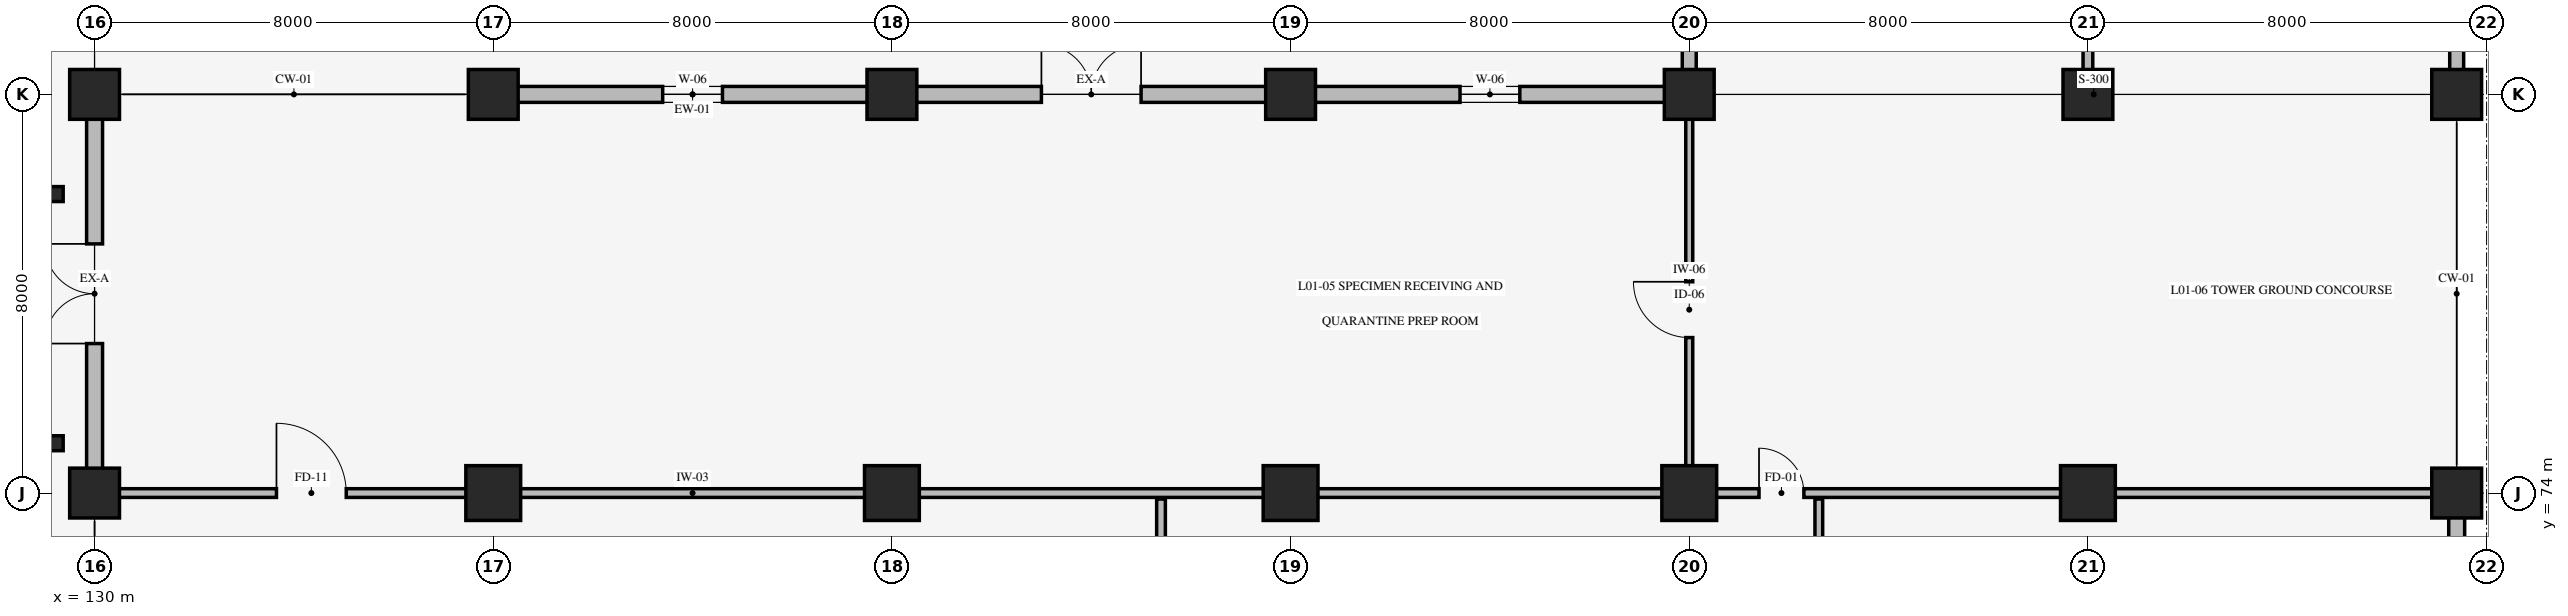
"""IFC4 building model, lengths in metres.
Left out: names, types, materials, properties, quantities, classifications, styles, units other than length and angle.
Written with IfcOpenShell. Run it as: python <this file> out.ifc"""

import sys

from ifc_helpers import new_model, si_unit, direction, frame, frame_2d, origin, origin_2d, place, context, subcontext, project, spatial, rectangle, hollow_rectangle, extrude, element, fill, save


model = new_model("IFC4")
c1 = context("Model", 3, precision=1e-05, world=origin(), true_north=direction((0.0, 1.0)))
c2 = subcontext(c1, "Body", "Model", "MODEL_VIEW")
j1 = project(units=[si_unit("LENGTHUNIT", "METRE"), si_unit("PLANEANGLEUNIT", "RADIAN")], contexts=[c1])
p1 = place(None, origin())
s1 = spatial("IfcSite", under=j1, at=p1, CompositionType="ELEMENT")
p2 = place(p1, origin())
s2 = spatial("IfcBuilding", under=s1, at=p2, CompositionType="ELEMENT")
p3 = place(p2, origin())
s3 = spatial("IfcBuildingStorey", under=s2, at=p3, CompositionType="ELEMENT", Elevation=0.0)
for number, where, z_axis, x_axis in (
    (1, (130.0, 74.0, 0.0), (0.0, 0.0, 1.0), (1.0, 0.0, 0.0)),
    (2, (130.0, 82.0, 0.0), (0.0, 0.0, 1.0), (1.0, 0.0, 0.0)),
):
    element("IfcColumn", number, at=place(p3, frame(where, z_axis=z_axis, x_axis=x_axis)), inside=s3, PredefinedType="COLUMN", context=c2, shape_type="SweptSolid", body=[
        extrude(rectangle(XDim=1.0, YDim=1.0, at=origin_2d()), origin(), (0.0, 0.0, 1.0), 5.4),
    ])
p4 = place(p3, frame((138.0, 74.0, 0.0), z_axis=(0.0, 0.0, 1.0), x_axis=(1.0, 0.0, 0.0)))
e3 = element("IfcColumn", 3, at=p4, inside=s3, PredefinedType="COLUMN", context=c2, shape_type="SweptSolid", body=[
    extrude(rectangle(XDim=1.1, YDim=1.1, at=origin_2d()), origin(), (0.0, 0.0, 1.0), 5.4),
])
p5 = place(p3, frame((138.0, 82.0, 0.0), z_axis=(0.0, 0.0, 1.0), x_axis=(1.0, 0.0, 0.0)))
e4 = element("IfcColumn", 4, at=p5, inside=s3, PredefinedType="COLUMN", context=c2, shape_type="SweptSolid", body=[
    extrude(rectangle(XDim=1.0, YDim=1.0, at=origin_2d()), origin(), (0.0, 0.0, 1.0), 5.4),
])
p6 = place(p3, frame((146.0, 74.0, 0.0), z_axis=(0.0, 0.0, 1.0), x_axis=(1.0, 0.0, 0.0)))
e5 = element("IfcColumn", 5, at=p6, inside=s3, PredefinedType="COLUMN", context=c2, shape_type="SweptSolid", body=[
    extrude(rectangle(XDim=1.1, YDim=1.1, at=origin_2d()), origin(), (0.0, 0.0, 1.0), 5.4),
])
p7 = place(p3, frame((146.0, 82.0, 0.0), z_axis=(0.0, 0.0, 1.0), x_axis=(1.0, 0.0, 0.0)))
e6 = element("IfcColumn", 6, at=p7, inside=s3, PredefinedType="COLUMN", context=c2, shape_type="SweptSolid", body=[
    extrude(rectangle(XDim=1.0, YDim=1.0, at=origin_2d()), origin(), (0.0, 0.0, 1.0), 5.4),
])
p8 = place(p3, frame((154.0, 74.0, 0.0), z_axis=(0.0, 0.0, 1.0), x_axis=(1.0, 0.0, 0.0)))
e7 = element("IfcColumn", 7, at=p8, inside=s3, PredefinedType="COLUMN", context=c2, shape_type="SweptSolid", body=[
    extrude(rectangle(XDim=1.1, YDim=1.1, at=origin_2d()), origin(), (0.0, 0.0, 1.0), 5.4),
])
p9 = place(p3, frame((154.0, 82.0, 0.0), z_axis=(0.0, 0.0, 1.0), x_axis=(1.0, 0.0, 0.0)))
e8 = element("IfcColumn", 8, at=p9, inside=s3, PredefinedType="COLUMN", context=c2, shape_type="SweptSolid", body=[
    extrude(rectangle(XDim=1.0, YDim=1.0, at=origin_2d()), origin(), (0.0, 0.0, 1.0), 5.4),
])
p10 = place(p3, frame((162.0, 74.0, 0.0), z_axis=(0.0, 0.0, 1.0), x_axis=(1.0, 0.0, 0.0)))
e9 = element("IfcColumn", 9, at=p10, inside=s3, PredefinedType="COLUMN", context=c2, shape_type="SweptSolid", body=[
    extrude(rectangle(XDim=1.1, YDim=1.1, at=origin_2d()), origin(), (0.0, 0.0, 1.0), 5.4),
])
p11 = place(p3, frame((162.0, 82.0, 0.0), z_axis=(0.0, 0.0, 1.0), x_axis=(1.0, 0.0, 0.0)))
e10 = element("IfcColumn", 10, at=p11, inside=s3, PredefinedType="COLUMN", context=c2, shape_type="SweptSolid", body=[
    extrude(rectangle(XDim=1.0, YDim=1.0, at=origin_2d()), origin(), (0.0, 0.0, 1.0), 5.4),
])
p12 = place(p3, frame((170.0, 74.0, 0.0), z_axis=(0.0, 0.0, 1.0), x_axis=(1.0, 0.0, 0.0)))
e11 = element("IfcColumn", 11, at=p12, inside=s3, PredefinedType="COLUMN", context=c2, shape_type="SweptSolid", body=[
    extrude(rectangle(XDim=1.1, YDim=1.1, at=origin_2d()), origin(), (0.0, 0.0, 1.0), 5.4),
])
for number, where, z_axis, x_axis in (
    (12, (170.0, 82.0, 0.0), (0.0, 0.0, 1.0), (1.0, 0.0, 0.0)),
    (13, (177.4, 74.0, 0.0), (0.0, 0.0, 1.0), (1.0, 0.0, 0.0)),
    (14, (177.4, 82.0, 0.0), (0.0, 0.0, 1.0), (1.0, 0.0, 0.0)),
):
    element("IfcColumn", number, at=place(p3, frame(where, z_axis=z_axis, x_axis=x_axis)), inside=s3, PredefinedType="COLUMN", context=c2, shape_type="SweptSolid", body=[
        extrude(rectangle(XDim=1.0, YDim=1.0, at=origin_2d()), origin(), (0.0, 0.0, 1.0), 5.4),
    ])
for number, where, z_axis, x_axis in (
    (15, (129.22, 75.0, 0.0), (0.0, 0.0, 1.0), (1.0, 0.0, 0.0)),
    (16, (129.22, 80.0, 0.0), (0.0, 0.0, 1.0), (1.0, 0.0, 0.0)),
):
    element("IfcColumn", number, at=place(p3, frame(where, z_axis=z_axis, x_axis=x_axis)), inside=s3, PredefinedType="COLUMN", context=c2, shape_type="SweptSolid", body=[
        extrude(hollow_rectangle(XDim=0.3, YDim=0.3, WallThickness=0.01, at=origin_2d()), origin(), (0.0, 0.0, 1.0), 4.34),
    ])
p13 = place(p3, frame((130.0, 74.0, 0.0), z_axis=(0.0, 0.0, 1.0), x_axis=(0.0, 1.0, 0.0)))
e17 = element("IfcWall", 17, at=p13, inside=s3, PredefinedType="STANDARD", context=c2, shape_type="SweptSolid", body=[
    extrude(rectangle(XDim=8.0, YDim=0.32, at=frame_2d((4.0, 0.0))), origin(), (0.0, 0.0, 1.0), 4.15),
])
p14 = place(p13, frame((3.0, 0.0, 0.0)))
e18 = element("IfcOpeningElement", 18, at=p14, cuts=e17, PredefinedType="OPENING", context=c2, shape_type="SweptSolid", body=[
    extrude(rectangle(XDim=2.0, YDim=2.4, at=frame_2d((1.0, 1.2))), frame((0.0, 0.17, 0.0), z_axis=(0.0, -1.0, 0.0), x_axis=(1.0, 0.0, 0.0)), (0.0, 0.0, 1.0), 0.34),
])
p15 = place(p3, frame((138.0, 82.0, 0.0), z_axis=(0.0, 0.0, 1.0), x_axis=(1.0, 0.0, 0.0)))
e19 = element("IfcWall", 19, at=p15, inside=s3, PredefinedType="STANDARD", context=c2, shape_type="SweptSolid", body=[
    extrude(rectangle(XDim=8.0, YDim=0.32, at=frame_2d((4.0, 0.0))), origin(), (0.0, 0.0, 1.0), 4.2),
])
p16 = place(p15, frame((3.4, 0.0, 0.85)))
e20 = element("IfcOpeningElement", 20, at=p16, cuts=e19, PredefinedType="OPENING", context=c2, shape_type="SweptSolid", body=[
    extrude(rectangle(XDim=1.2, YDim=1.2, at=frame_2d((0.6, 0.6))), frame((0.0, 0.17, 0.0), z_axis=(0.0, -1.0, 0.0), x_axis=(1.0, 0.0, 0.0)), (0.0, 0.0, 1.0), 0.34),
])
p17 = place(p3, frame((146.0, 82.0, 0.0), z_axis=(0.0, 0.0, 1.0), x_axis=(1.0, 0.0, 0.0)))
e21 = element("IfcWall", 21, at=p17, inside=s3, PredefinedType="STANDARD", context=c2, shape_type="SweptSolid", body=[
    extrude(rectangle(XDim=8.0, YDim=0.32, at=frame_2d((4.0, 0.0))), origin(), (0.0, 0.0, 1.0), 4.2),
])
p18 = place(p17, frame((3.0, 0.0, 0.0)))
e22 = element("IfcOpeningElement", 22, at=p18, cuts=e21, PredefinedType="OPENING", context=c2, shape_type="SweptSolid", body=[
    extrude(rectangle(XDim=2.0, YDim=2.4, at=frame_2d((1.0, 1.2))), frame((0.0, 0.17, 0.0), z_axis=(0.0, -1.0, 0.0), x_axis=(1.0, 0.0, 0.0)), (0.0, 0.0, 1.0), 0.34),
])
p19 = place(p3, frame((154.0, 82.0, 0.0), z_axis=(0.0, 0.0, 1.0), x_axis=(1.0, 0.0, 0.0)))
e23 = element("IfcWall", 23, at=p19, inside=s3, PredefinedType="STANDARD", context=c2, shape_type="SweptSolid", body=[
    extrude(rectangle(XDim=8.0, YDim=0.32, at=frame_2d((4.0, 0.0))), origin(), (0.0, 0.0, 1.0), 4.2),
])
p20 = place(p19, frame((3.4, 0.0, 0.85)))
e24 = element("IfcOpeningElement", 24, at=p20, cuts=e23, PredefinedType="OPENING", context=c2, shape_type="SweptSolid", body=[
    extrude(rectangle(XDim=1.2, YDim=1.2, at=frame_2d((0.6, 0.6))), frame((0.0, 0.17, 0.0), z_axis=(0.0, -1.0, 0.0), x_axis=(1.0, 0.0, 0.0)), (0.0, 0.0, 1.0), 0.34),
])
p21 = place(p3, frame((177.4, 74.0, 0.0), z_axis=(0.0, 0.0, 1.0), x_axis=(0.0, -1.0, 0.0)))
e25 = element("IfcWall", 25, at=p21, inside=s3, PredefinedType="STANDARD", context=c2, shape_type="SweptSolid", body=[
    extrude(rectangle(XDim=8.0, YDim=0.32, at=frame_2d((4.0, 0.0))), origin(), (0.0, 0.0, 1.0), 4.15),
])
p22 = place(p21, frame((3.0, 0.0, 0.0)))
e26 = element("IfcOpeningElement", 26, at=p22, cuts=e25, PredefinedType="OPENING", context=c2, shape_type="SweptSolid", body=[
    extrude(rectangle(XDim=2.0, YDim=2.4, at=frame_2d((1.0, 1.2))), frame((0.0, 0.17, 0.0), z_axis=(0.0, -1.0, 0.0), x_axis=(1.0, 0.0, 0.0)), (0.0, 0.0, 1.0), 0.34),
])
p23 = place(p3, frame((177.4, 106.0, 0.0), z_axis=(0.0, 0.0, 1.0), x_axis=(0.0, -1.0, 0.0)))
e27 = element("IfcWall", 27, at=p23, inside=s3, PredefinedType="STANDARD", context=c2, shape_type="SweptSolid", body=[
    extrude(rectangle(XDim=24.0, YDim=0.28, at=frame_2d((12.0, 0.0))), origin(), (0.0, 0.0, 1.0), 5.7),
])
p24 = place(p23, frame((5.1, 0.0, 0.0)))
e28 = element("IfcOpeningElement", 28, at=p24, cuts=e27, PredefinedType="OPENING", context=c2, shape_type="SweptSolid", body=[
    extrude(rectangle(XDim=1.8, YDim=2.4, at=frame_2d((0.9, 1.2))), frame((0.0, 0.15, 0.0), z_axis=(0.0, -1.0, 0.0), x_axis=(1.0, 0.0, 0.0)), (0.0, 0.0, 1.0), 0.3),
])
p25 = place(p23, frame((13.5, 0.0, 0.0)))
e29 = element("IfcOpeningElement", 29, at=p25, cuts=e27, PredefinedType="OPENING", context=c2, shape_type="SweptSolid", body=[
    extrude(rectangle(XDim=2.6, YDim=2.5, at=frame_2d((1.3, 1.25))), frame((0.0, 0.15, 0.0), z_axis=(0.0, -1.0, 0.0), x_axis=(1.0, 0.0, 0.0)), (0.0, 0.0, 1.0), 0.3),
])
p26 = place(p23, frame((19.0, 0.0, 0.0)))
e30 = element("IfcOpeningElement", 30, at=p26, cuts=e27, PredefinedType="OPENING", context=c2, shape_type="SweptSolid", body=[
    extrude(rectangle(XDim=2.6, YDim=2.5, at=frame_2d((1.3, 1.25))), frame((0.0, 0.15, 0.0), z_axis=(0.0, -1.0, 0.0), x_axis=(1.0, 0.0, 0.0)), (0.0, 0.0, 1.0), 0.3),
])
p27 = place(p3, frame((162.0, 82.0, 0.0), z_axis=(0.0, 0.0, 1.0), x_axis=(0.0, 1.0, 0.0)))
e31 = element("IfcWall", 31, at=p27, inside=s3, PredefinedType="STANDARD", context=c2, shape_type="SweptSolid", body=[
    extrude(rectangle(XDim=16.0, YDim=0.28, at=frame_2d((8.0, 0.0))), origin(), (0.0, 0.0, 1.0), 5.7),
])
p28 = place(p3, frame((170.0, 82.05, 0.0), z_axis=(0.0, 0.0, 1.0), x_axis=(0.0, 1.0, 0.0)))
e32 = element("IfcWall", 32, at=p28, inside=s3, PredefinedType="STANDARD", context=c2, shape_type="SweptSolid", body=[
    extrude(rectangle(XDim=43.3, YDim=0.195, at=frame_2d((21.65, 0.0))), origin(), (0.0, 0.0, 1.0), 5.1),
])
p29 = place(p3, frame((151.4, 54.12, 0.0), z_axis=(0.0, 0.0, 1.0), x_axis=(0.0, 1.0, 0.0)))
e33 = element("IfcWall", 33, at=p29, inside=s3, PredefinedType="STANDARD", context=c2, shape_type="SweptSolid", body=[
    extrude(rectangle(XDim=19.76, YDim=0.175, at=frame_2d((9.88, 0.0))), origin(), (0.0, 0.0, 1.0), 5.1),
])
p30 = place(p29, frame((9.355, 0.0, 0.0)))
e34 = element("IfcOpeningElement", 34, at=p30, cuts=e33, PredefinedType="OPENING", context=c2, shape_type="SweptSolid", body=[
    extrude(rectangle(XDim=1.05, YDim=2.1, at=frame_2d((0.525, 1.05))), frame((0.0, 0.098, 0.0), z_axis=(0.0, -1.0, 0.0), x_axis=(1.0, 0.0, 0.0)), (0.0, 0.0, 1.0), 0.195),
])
p31 = place(p3, frame((164.6, 58.08, 0.0), z_axis=(0.0, 0.0, 1.0), x_axis=(0.0, 1.0, 0.0)))
e35 = element("IfcWall", 35, at=p31, inside=s3, PredefinedType="STANDARD", context=c2, shape_type="SweptSolid", body=[
    extrude(rectangle(XDim=15.8, YDim=0.155, at=frame_2d((7.9, 0.0))), origin(), (0.0, 0.0, 1.0), 5.1),
])
p32 = place(p31, frame((7.35, 0.0, 0.0)))
e36 = element("IfcOpeningElement", 36, at=p32, cuts=e35, PredefinedType="OPENING", context=c2, shape_type="SweptSolid", body=[
    extrude(rectangle(XDim=1.1, YDim=2.1, at=frame_2d((0.55, 1.05))), frame((0.0, 0.087, 0.0), z_axis=(0.0, -1.0, 0.0), x_axis=(1.0, 0.0, 0.0)), (0.0, 0.0, 1.0), 0.175),
])
p33 = place(p3, frame((130.35, 74.0, 0.0), z_axis=(0.0, 0.0, 1.0), x_axis=(1.0, 0.0, 0.0)))
e37 = element("IfcWall", 37, at=p33, inside=s3, PredefinedType="STANDARD", context=c2, shape_type="SweptSolid", body=[
    extrude(rectangle(XDim=31.3, YDim=0.175, at=frame_2d((15.65, 0.0))), origin(), (0.0, 0.0, 1.0), 4.2),
])
p34 = place(p33, frame((3.3, 0.0, 0.0)))
e38 = element("IfcOpeningElement", 38, at=p34, cuts=e37, PredefinedType="OPENING", context=c2, shape_type="SweptSolid", body=[
    extrude(rectangle(XDim=1.4, YDim=2.2, at=frame_2d((0.7, 1.1))), frame((0.0, 0.098, 0.0), z_axis=(0.0, -1.0, 0.0), x_axis=(1.0, 0.0, 0.0)), (0.0, 0.0, 1.0), 0.195),
])
p35 = place(p3, frame((162.0, 74.12, 0.0), z_axis=(0.0, 0.0, 1.0), x_axis=(0.0, 1.0, 0.0)))
e39 = element("IfcWall", 39, at=p35, inside=s3, PredefinedType="STANDARD", context=c2, shape_type="SweptSolid", body=[
    extrude(rectangle(XDim=7.83, YDim=0.14, at=frame_2d((3.915, 0.0))), origin(), (0.0, 0.0, 1.0), 4.15),
])
p36 = place(p35, frame((3.0, 0.0, 0.0)))
e40 = element("IfcOpeningElement", 40, at=p36, cuts=e39, PredefinedType="OPENING", context=c2, shape_type="SweptSolid", body=[
    extrude(rectangle(XDim=1.12, YDim=2.12, at=frame_2d((0.56, 1.06))), frame((0.0, 0.08, 0.0), z_axis=(0.0, -1.0, 0.0), x_axis=(1.0, 0.0, 0.0)), (0.0, 0.0, 1.0), 0.16),
])
p37 = place(p3, frame((162.35, 74.0, 0.0), z_axis=(0.0, 0.0, 1.0), x_axis=(1.0, 0.0, 0.0)))
e41 = element("IfcWall", 41, at=p37, inside=s3, PredefinedType="STANDARD", context=c2, shape_type="SweptSolid", body=[
    extrude(rectangle(XDim=14.7, YDim=0.175, at=frame_2d((7.35, 0.0))), origin(), (0.0, 0.0, 1.0), 4.2),
])
p38 = place(p37, frame((1.05, 0.0, 0.0)))
e42 = element("IfcOpeningElement", 42, at=p38, cuts=e41, PredefinedType="OPENING", context=c2, shape_type="SweptSolid", body=[
    extrude(rectangle(XDim=0.9, YDim=2.1, at=frame_2d((0.45, 1.05))), frame((0.0, 0.098, 0.0), z_axis=(0.0, -1.0, 0.0), x_axis=(1.0, 0.0, 0.0)), (0.0, 0.0, 1.0), 0.195),
])
p39 = place(p14, origin())
e43 = element("IfcDoor", 43, at=p39, inside=s3, OperationType="DOUBLE_DOOR_SINGLE_SWING", PredefinedType="DOOR", context=c2, shape_type="SweptSolid", body=[
    extrude(rectangle(XDim=2.0, YDim=2.4, at=frame_2d((1.0, 1.2))), frame((0.0, 0.025, 0.0), z_axis=(0.0, -1.0, 0.0), x_axis=(1.0, 0.0, 0.0)), (0.0, 0.0, 1.0), 0.05),
])
fill(e18, e43)
p40 = place(p16, origin())
e44 = element("IfcWindow", 44, at=p40, inside=s3, PartitioningType="SINGLE_PANEL", PredefinedType="WINDOW", context=c2, shape_type="SweptSolid", body=[
    extrude(rectangle(XDim=1.2, YDim=1.2, at=frame_2d((0.6, 0.6))), frame((0.0, 0.03, 0.0), z_axis=(0.0, -1.0, 0.0), x_axis=(1.0, 0.0, 0.0)), (0.0, 0.0, 1.0), 0.06),
])
fill(e20, e44)
p41 = place(p18, origin())
e45 = element("IfcDoor", 45, at=p41, inside=s3, OperationType="DOUBLE_DOOR_SINGLE_SWING", PredefinedType="DOOR", context=c2, shape_type="SweptSolid", body=[
    extrude(rectangle(XDim=2.0, YDim=2.4, at=frame_2d((1.0, 1.2))), frame((0.0, 0.025, 0.0), z_axis=(0.0, -1.0, 0.0), x_axis=(1.0, 0.0, 0.0)), (0.0, 0.0, 1.0), 0.05),
])
fill(e22, e45)
p42 = place(p20, origin())
e46 = element("IfcWindow", 46, at=p42, inside=s3, PartitioningType="SINGLE_PANEL", PredefinedType="WINDOW", context=c2, shape_type="SweptSolid", body=[
    extrude(rectangle(XDim=1.2, YDim=1.2, at=frame_2d((0.6, 0.6))), frame((0.0, 0.03, 0.0), z_axis=(0.0, -1.0, 0.0), x_axis=(1.0, 0.0, 0.0)), (0.0, 0.0, 1.0), 0.06),
])
fill(e24, e46)
p43 = place(p34, origin())
e47 = element("IfcDoor", 47, at=p43, inside=s3, OperationType="SINGLE_SWING_LEFT", PredefinedType="DOOR", context=c2, shape_type="SweptSolid", body=[
    extrude(rectangle(XDim=1.4, YDim=2.2, at=frame_2d((0.7, 1.1))), frame((0.0, 0.025, 0.0), z_axis=(0.0, -1.0, 0.0), x_axis=(1.0, 0.0, 0.0)), (0.0, 0.0, 1.0), 0.05),
])
fill(e38, e47)
p44 = place(p36, origin())
e48 = element("IfcDoor", 48, at=p44, inside=s3, OperationType="SINGLE_SWING_RIGHT", PredefinedType="DOOR", context=c2, shape_type="SweptSolid", body=[
    extrude(rectangle(XDim=1.12, YDim=2.12, at=frame_2d((0.56, 1.06))), frame((0.0, 0.025, 0.0), z_axis=(0.0, -1.0, 0.0), x_axis=(1.0, 0.0, 0.0)), (0.0, 0.0, 1.0), 0.05),
])
fill(e40, e48)
p45 = place(p38, origin())
e49 = element("IfcDoor", 49, at=p45, inside=s3, OperationType="SINGLE_SWING_LEFT", PredefinedType="DOOR", context=c2, shape_type="SweptSolid", body=[
    extrude(rectangle(XDim=0.9, YDim=2.1, at=frame_2d((0.45, 1.05))), frame((0.0, 0.025, 0.0), z_axis=(0.0, -1.0, 0.0), x_axis=(1.0, 0.0, 0.0)), (0.0, 0.0, 1.0), 0.05),
])
fill(e42, e49)
save(model, sys.argv[1])
